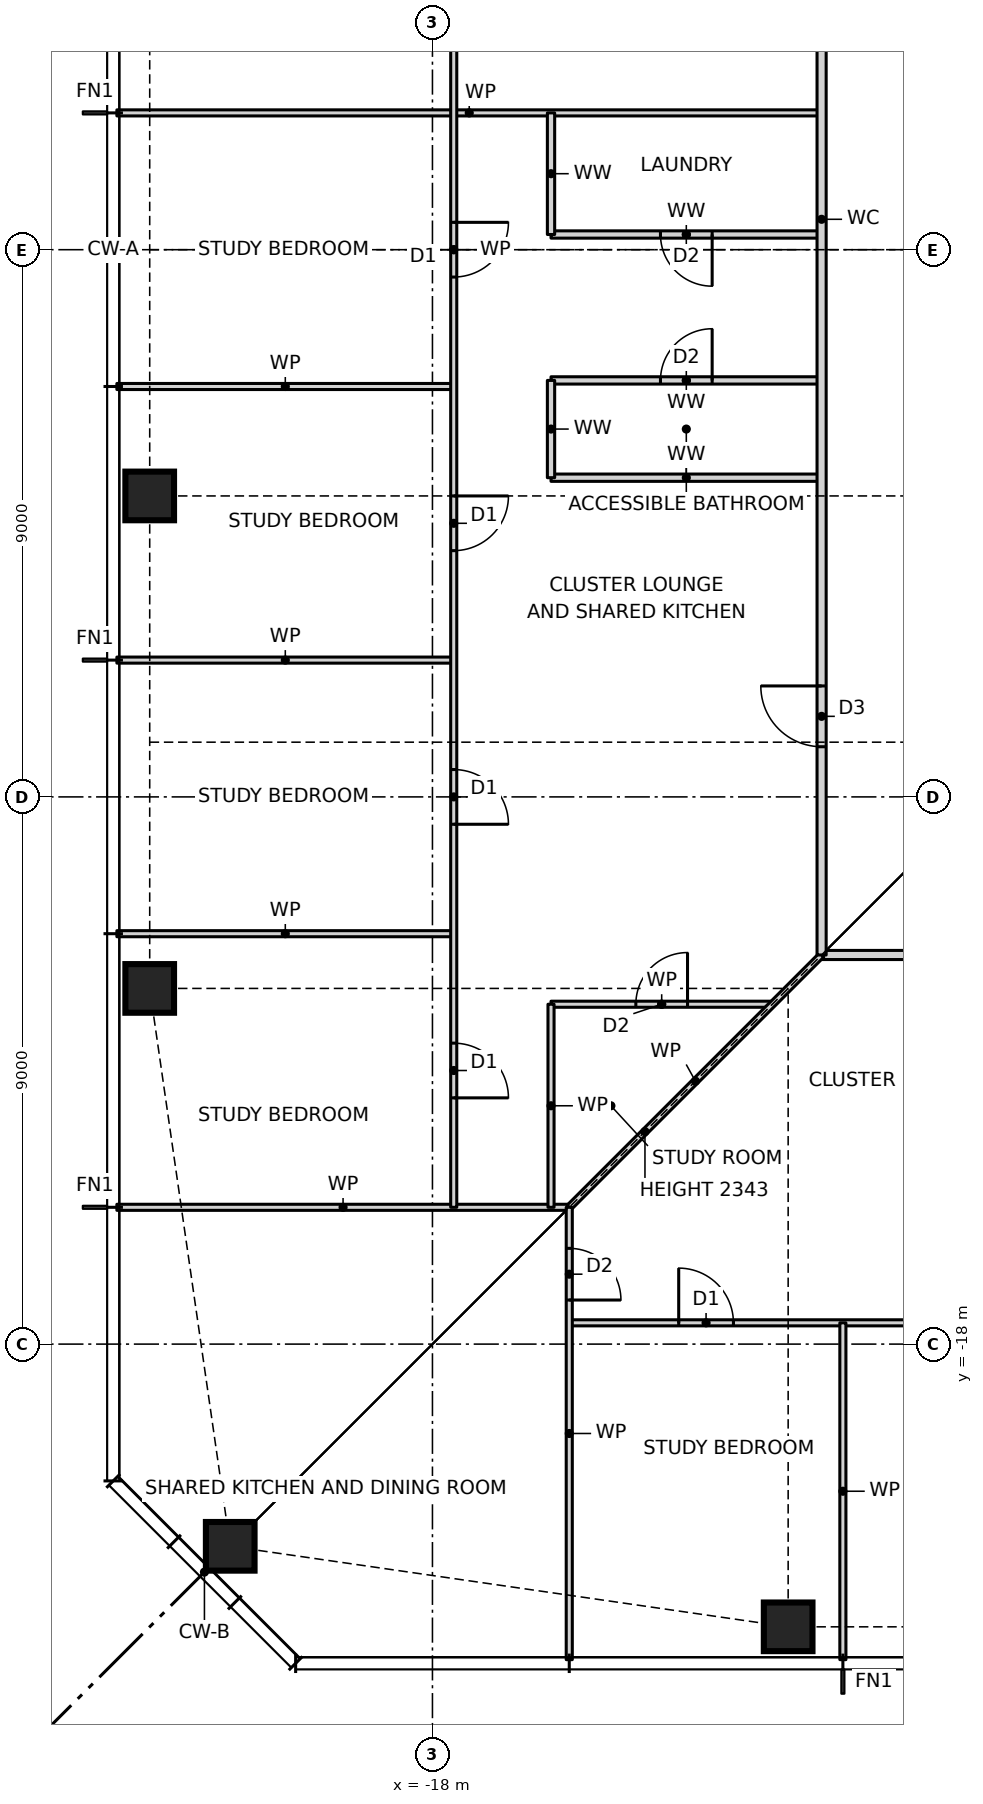
"""IFC4 building model, lengths in metres.
Left out: names, types, materials, properties, quantities, classifications, styles, units other than length and angle.
Written with IfcOpenShell. Run it as: python <this file> out.ifc"""

import sys

from ifc_helpers import new_model, si_unit, direction, frame, frame_2d, origin, origin_2d, place, context, subcontext, project, spatial, rectangle, hollow_rectangle, extrude, element, fill, save


model = new_model("IFC4")
c1 = context("Model", 3, precision=1e-05, world=origin(), true_north=direction((0.0, 1.0)))
c2 = subcontext(c1, "Body", "Model", "MODEL_VIEW")
j1 = project(units=[si_unit("LENGTHUNIT", "METRE"), si_unit("PLANEANGLEUNIT", "RADIAN")], contexts=[c1])
p1 = place(None, origin())
s1 = spatial("IfcSite", under=j1, at=p1, CompositionType="ELEMENT")
p2 = place(p1, origin())
s2 = spatial("IfcBuilding", under=s1, at=p2, CompositionType="ELEMENT")
p3 = place(p2, frame((0.0, 0.0, 64.0)))
s3 = spatial("IfcBuildingStorey", under=s2, at=p3, CompositionType="ELEMENT", Elevation=64.0)
for number, where, z_axis, x_axis in (
    (1, (-21.326, -21.326, 0.0), (0.0, 0.0, 1.0), (1.0, 0.0, 0.0)),
    (2, (-12.15, -22.65, 0.0), (0.0, 0.0, 1.0), (1.0, 0.0, 0.0)),
    (3, (-22.65, -4.05, 0.0), (0.0, 0.0, 1.0), (1.0, 0.0, 0.0)),
    (4, (-22.65, -12.15, 0.0), (0.0, 0.0, 1.0), (1.0, 0.0, 0.0)),
):
    element("IfcColumn", number, at=place(p3, frame(where, z_axis=z_axis, x_axis=x_axis)), inside=s3, PredefinedType="COLUMN", context=c2, shape_type="SweptSolid", body=[
        extrude(hollow_rectangle(XDim=0.8, YDim=0.8, WallThickness=0.09, at=origin_2d()), origin(), (0.0, 0.0, 1.0), 3.5),
    ])
p4 = place(p3, frame((-15.75, -17.65, 0.0), z_axis=(0.0, 0.0, 1.0), x_axis=(1.0, 0.0, 0.0)))
e5 = element("IfcWall", 5, at=p4, inside=s3, PredefinedType="PARTITIONING", context=c2, shape_type="SweptSolid", body=[
    extrude(rectangle(XDim=31.5, YDim=0.1, at=frame_2d((15.75, 0.0))), origin(), (0.0, 0.0, 1.0), 3.27),
])
p5 = place(p4, frame((1.8, 0.0, 0.0)))
e6 = element("IfcOpeningElement", 6, at=p5, cuts=e5, PredefinedType="OPENING", context=c2, shape_type="SweptSolid", body=[
    extrude(rectangle(XDim=0.9, YDim=2.1, at=frame_2d((0.45, 1.05))), frame((0.0, 0.06, 0.0), z_axis=(0.0, -1.0, 0.0), x_axis=(1.0, 0.0, 0.0)), (0.0, 0.0, 1.0), 0.12),
])
p6 = place(p4, frame((6.3, 0.0, 0.0)))
e7 = element("IfcOpeningElement", 7, at=p6, cuts=e5, PredefinedType="OPENING", context=c2, shape_type="SweptSolid", body=[
    extrude(rectangle(XDim=0.9, YDim=2.1, at=frame_2d((0.45, 1.05))), frame((0.0, 0.06, 0.0), z_axis=(0.0, -1.0, 0.0), x_axis=(1.0, 0.0, 0.0)), (0.0, 0.0, 1.0), 0.12),
])
p7 = place(p4, frame((10.8, 0.0, 0.0)))
e8 = element("IfcOpeningElement", 8, at=p7, cuts=e5, PredefinedType="OPENING", context=c2, shape_type="SweptSolid", body=[
    extrude(rectangle(XDim=0.9, YDim=2.1, at=frame_2d((0.45, 1.05))), frame((0.0, 0.06, 0.0), z_axis=(0.0, -1.0, 0.0), x_axis=(1.0, 0.0, 0.0)), (0.0, 0.0, 1.0), 0.12),
])
p8 = place(p4, frame((15.3, 0.0, 0.0)))
e9 = element("IfcOpeningElement", 9, at=p8, cuts=e5, PredefinedType="OPENING", context=c2, shape_type="SweptSolid", body=[
    extrude(rectangle(XDim=0.9, YDim=2.1, at=frame_2d((0.45, 1.05))), frame((0.0, 0.06, 0.0), z_axis=(0.0, -1.0, 0.0), x_axis=(1.0, 0.0, 0.0)), (0.0, 0.0, 1.0), 0.12),
])
p9 = place(p4, frame((19.8, 0.0, 0.0)))
e10 = element("IfcOpeningElement", 10, at=p9, cuts=e5, PredefinedType="OPENING", context=c2, shape_type="SweptSolid", body=[
    extrude(rectangle(XDim=0.9, YDim=2.1, at=frame_2d((0.45, 1.05))), frame((0.0, 0.06, 0.0), z_axis=(0.0, -1.0, 0.0), x_axis=(1.0, 0.0, 0.0)), (0.0, 0.0, 1.0), 0.12),
])
p10 = place(p4, frame((24.3, 0.0, 0.0)))
e11 = element("IfcOpeningElement", 11, at=p10, cuts=e5, PredefinedType="OPENING", context=c2, shape_type="SweptSolid", body=[
    extrude(rectangle(XDim=0.9, YDim=2.1, at=frame_2d((0.45, 1.05))), frame((0.0, 0.06, 0.0), z_axis=(0.0, -1.0, 0.0), x_axis=(1.0, 0.0, 0.0)), (0.0, 0.0, 1.0), 0.12),
])
p11 = place(p4, frame((28.8, 0.0, 0.0)))
e12 = element("IfcOpeningElement", 12, at=p11, cuts=e5, PredefinedType="OPENING", context=c2, shape_type="SweptSolid", body=[
    extrude(rectangle(XDim=0.9, YDim=2.1, at=frame_2d((0.45, 1.05))), frame((0.0, 0.06, 0.0), z_axis=(0.0, -1.0, 0.0), x_axis=(1.0, 0.0, 0.0)), (0.0, 0.0, 1.0), 0.12),
])
p12 = place(p3, frame((-23.19, -15.75, 0.0), z_axis=(0.0, 0.0, 1.0), x_axis=(1.0, 0.0, 0.0)))
e13 = element("IfcWall", 13, at=p12, inside=s3, PredefinedType="PARTITIONING", context=c2, shape_type="SweptSolid", body=[
    extrude(rectangle(XDim=7.44, YDim=0.1, at=frame_2d((3.72, 0.0))), origin(), (0.0, 0.0, 1.0), 3.27),
])
p13 = place(p3, frame((-16.05, -12.41, 0.0), z_axis=(0.0, 0.0, 1.0), x_axis=(1.0, 0.0, 0.0)))
e14 = element("IfcWall", 14, at=p13, inside=s3, PredefinedType="PARTITIONING", context=c2, shape_type="SweptSolid", body=[
    extrude(rectangle(XDim=3.64, YDim=0.1, at=frame_2d((1.82, 0.0))), origin(), (0.0, 0.0, 1.0), 3.27),
])
p14 = place(p13, frame((1.395, 0.0, 0.0)))
e15 = element("IfcOpeningElement", 15, at=p14, cuts=e14, PredefinedType="OPENING", context=c2, shape_type="SweptSolid", body=[
    extrude(rectangle(XDim=0.85, YDim=2.1, at=frame_2d((0.425, 1.05))), frame((0.0, 0.06, 0.0), z_axis=(0.0, -1.0, 0.0), x_axis=(1.0, 0.0, 0.0)), (0.0, 0.0, 1.0), 0.12),
])
p15 = place(p3, frame((-11.6, -11.6, 0.0), z_axis=(0.0, 0.0, 1.0), x_axis=(1.0, 0.0, 0.0)))
e16 = element("IfcWall", 16, at=p15, inside=s3, PredefinedType="PARTITIONING", context=c2, shape_type="SweptSolid", body=[
    extrude(rectangle(XDim=23.2, YDim=0.15, at=frame_2d((11.6, 0.0))), origin(), (0.0, 0.0, 1.0), 3.27),
])
p16 = place(p15, frame((1.755, 0.0, 0.0)))
e17 = element("IfcOpeningElement", 17, at=p16, cuts=e16, PredefinedType="OPENING", context=c2, shape_type="SweptSolid", body=[
    extrude(rectangle(XDim=1.0, YDim=2.1, at=frame_2d((0.5, 1.05))), frame((0.0, 0.085, 0.0), z_axis=(0.0, -1.0, 0.0), x_axis=(1.0, 0.0, 0.0)), (0.0, 0.0, 1.0), 0.17),
])
p17 = place(p15, frame((21.025, 0.0, 0.0)))
e18 = element("IfcOpeningElement", 18, at=p17, cuts=e16, PredefinedType="OPENING", context=c2, shape_type="SweptSolid", body=[
    extrude(rectangle(XDim=1.0, YDim=2.1, at=frame_2d((0.5, 1.05))), frame((0.0, 0.085, 0.0), z_axis=(0.0, -1.0, 0.0), x_axis=(1.0, 0.0, 0.0)), (0.0, 0.0, 1.0), 0.17),
])
for number, where, z_axis, x_axis in (
    (19, (-23.19, -11.25, 0.0), (0.0, 0.0, 1.0), (1.0, 0.0, 0.0)),
    (20, (-23.19, -6.75, 0.0), (0.0, 0.0, 1.0), (1.0, 0.0, 0.0)),
):
    element("IfcWall", number, at=place(p3, frame(where, z_axis=z_axis, x_axis=x_axis)), inside=s3, PredefinedType="PARTITIONING", context=c2, shape_type="SweptSolid", body=[
        extrude(rectangle(XDim=5.54, YDim=0.1, at=frame_2d((2.77, 0.0))), origin(), (0.0, 0.0, 1.0), 3.27),
    ])
p18 = place(p3, frame((-16.05, -3.75, 0.0), z_axis=(0.0, 0.0, 1.0), x_axis=(1.0, 0.0, 0.0)))
e21 = element("IfcWall", 21, at=p18, inside=s3, PredefinedType="PARTITIONING", context=c2, shape_type="SweptSolid", body=[
    extrude(rectangle(XDim=4.45, YDim=0.12, at=frame_2d((2.225, 0.0))), origin(), (0.0, 0.0, 1.0), 3.27),
])
p19 = place(p3, frame((-23.19, -2.25, 0.0), z_axis=(0.0, 0.0, 1.0), x_axis=(1.0, 0.0, 0.0)))
e22 = element("IfcWall", 22, at=p19, inside=s3, PredefinedType="PARTITIONING", context=c2, shape_type="SweptSolid", body=[
    extrude(rectangle(XDim=5.54, YDim=0.1, at=frame_2d((2.77, 0.0))), origin(), (0.0, 0.0, 1.0), 3.27),
])
p20 = place(p3, frame((-16.05, -2.15, 0.0), z_axis=(0.0, 0.0, 1.0), x_axis=(1.0, 0.0, 0.0)))
e23 = element("IfcWall", 23, at=p20, inside=s3, PredefinedType="PARTITIONING", context=c2, shape_type="SweptSolid", body=[
    extrude(rectangle(XDim=4.45, YDim=0.12, at=frame_2d((2.225, 0.0))), origin(), (0.0, 0.0, 1.0), 3.27),
])
p21 = place(p20, frame((1.8, 0.0, 0.0)))
e24 = element("IfcOpeningElement", 24, at=p21, cuts=e23, PredefinedType="OPENING", context=c2, shape_type="SweptSolid", body=[
    extrude(rectangle(XDim=0.85, YDim=2.1, at=frame_2d((0.425, 1.05))), frame((0.0, 0.07, 0.0), z_axis=(0.0, -1.0, 0.0), x_axis=(1.0, 0.0, 0.0)), (0.0, 0.0, 1.0), 0.14),
])
p22 = place(p3, frame((-16.05, 0.25, 0.0), z_axis=(0.0, 0.0, 1.0), x_axis=(1.0, 0.0, 0.0)))
e25 = element("IfcWall", 25, at=p22, inside=s3, PredefinedType="PARTITIONING", context=c2, shape_type="SweptSolid", body=[
    extrude(rectangle(XDim=4.45, YDim=0.12, at=frame_2d((2.225, 0.0))), origin(), (0.0, 0.0, 1.0), 3.27),
])
p23 = place(p22, frame((1.8, 0.0, 0.0)))
e26 = element("IfcOpeningElement", 26, at=p23, cuts=e25, PredefinedType="OPENING", context=c2, shape_type="SweptSolid", body=[
    extrude(rectangle(XDim=0.85, YDim=2.1, at=frame_2d((0.425, 1.05))), frame((0.0, 0.07, 0.0), z_axis=(0.0, -1.0, 0.0), x_axis=(1.0, 0.0, 0.0)), (0.0, 0.0, 1.0), 0.14),
])
p24 = place(p3, frame((-23.19, 2.25, 0.0), z_axis=(0.0, 0.0, 1.0), x_axis=(1.0, 0.0, 0.0)))
e27 = element("IfcWall", 27, at=p24, inside=s3, PredefinedType="PARTITIONING", context=c2, shape_type="SweptSolid", body=[
    extrude(rectangle(XDim=11.59, YDim=0.1, at=frame_2d((5.795, 0.0))), origin(), (0.0, 0.0, 1.0), 3.27),
])
p25 = place(p3, frame((-15.75, -15.75, 0.0), z_axis=(0.0, 0.0, 1.0), x_axis=(0.707106781187, 0.707106781187, 0.0)))
e28 = element("IfcWall", 28, at=p25, inside=s3, PredefinedType="PARTITIONING", context=c2, shape_type="SweptSolid", body=[
    extrude(rectangle(XDim=5.869, YDim=0.1, at=frame_2d((2.935, 0.0))), origin(), (0.0, 0.0, 1.0), 2.343),
])
p26 = place(p3, frame((-11.25, -23.19, 0.0), z_axis=(0.0, 0.0, 1.0), x_axis=(0.0, 1.0, 0.0)))
e29 = element("IfcWall", 29, at=p26, inside=s3, PredefinedType="PARTITIONING", context=c2, shape_type="SweptSolid", body=[
    extrude(rectangle(XDim=5.54, YDim=0.1, at=frame_2d((2.77, 0.0))), origin(), (0.0, 0.0, 1.0), 3.27),
])
p27 = place(p3, frame((-11.6, -11.6, 0.0), z_axis=(0.0, 0.0, 1.0), x_axis=(0.0, 1.0, 0.0)))
e30 = element("IfcWall", 30, at=p27, inside=s3, PredefinedType="PARTITIONING", context=c2, shape_type="SweptSolid", body=[
    extrude(rectangle(XDim=24.2, YDim=0.15, at=frame_2d((12.1, 0.0))), origin(), (0.0, 0.0, 1.0), 3.27),
])
p28 = place(p27, frame((19.225, 0.0, 0.0)))
e31 = element("IfcOpeningElement", 31, at=p28, cuts=e30, PredefinedType="OPENING", context=c2, shape_type="SweptSolid", body=[
    extrude(rectangle(XDim=1.0, YDim=2.1, at=frame_2d((0.5, 1.05))), frame((0.0, 0.085, 0.0), z_axis=(0.0, -1.0, 0.0), x_axis=(1.0, 0.0, 0.0)), (0.0, 0.0, 1.0), 0.17),
])
p29 = place(p27, frame((3.425, 0.0, 0.0)))
e32 = element("IfcOpeningElement", 32, at=p29, cuts=e30, PredefinedType="OPENING", context=c2, shape_type="SweptSolid", body=[
    extrude(rectangle(XDim=1.0, YDim=2.1, at=frame_2d((0.5, 1.05))), frame((0.0, 0.085, 0.0), z_axis=(0.0, -1.0, 0.0), x_axis=(1.0, 0.0, 0.0)), (0.0, 0.0, 1.0), 0.17),
])
p30 = place(p3, frame((-15.75, -23.19, 0.0), z_axis=(0.0, 0.0, 1.0), x_axis=(0.0, 1.0, 0.0)))
e33 = element("IfcWall", 33, at=p30, inside=s3, PredefinedType="PARTITIONING", context=c2, shape_type="SweptSolid", body=[
    extrude(rectangle(XDim=7.44, YDim=0.1, at=frame_2d((3.72, 0.0))), origin(), (0.0, 0.0, 1.0), 3.27),
])
p31 = place(p30, frame((5.915, 0.0, 0.0)))
e34 = element("IfcOpeningElement", 34, at=p31, cuts=e33, PredefinedType="OPENING", context=c2, shape_type="SweptSolid", body=[
    extrude(rectangle(XDim=0.85, YDim=2.1, at=frame_2d((0.425, 1.05))), frame((0.0, 0.06, 0.0), z_axis=(0.0, -1.0, 0.0), x_axis=(1.0, 0.0, 0.0)), (0.0, 0.0, 1.0), 0.12),
])
p32 = place(p3, frame((-16.05, -15.75, 0.0), z_axis=(0.0, 0.0, 1.0), x_axis=(0.0, 1.0, 0.0)))
e35 = element("IfcWall", 35, at=p32, inside=s3, PredefinedType="PARTITIONING", context=c2, shape_type="SweptSolid", body=[
    extrude(rectangle(XDim=3.34, YDim=0.1, at=frame_2d((1.67, 0.0))), origin(), (0.0, 0.0, 1.0), 3.27),
])
p33 = place(p3, frame((-16.05, -3.75, 0.0), z_axis=(0.0, 0.0, 1.0), x_axis=(0.0, 1.0, 0.0)))
e36 = element("IfcWall", 36, at=p33, inside=s3, PredefinedType="PARTITIONING", context=c2, shape_type="SweptSolid", body=[
    extrude(rectangle(XDim=1.6, YDim=0.12, at=frame_2d((0.8, 0.0))), origin(), (0.0, 0.0, 1.0), 3.27),
])
p34 = place(p3, frame((-16.05, 0.25, 0.0), z_axis=(0.0, 0.0, 1.0), x_axis=(0.0, 1.0, 0.0)))
e37 = element("IfcWall", 37, at=p34, inside=s3, PredefinedType="PARTITIONING", context=c2, shape_type="SweptSolid", body=[
    extrude(rectangle(XDim=2.0, YDim=0.12, at=frame_2d((1.0, 0.0))), origin(), (0.0, 0.0, 1.0), 3.27),
])
p35 = place(p3, frame((-17.65, -15.75, 0.0), z_axis=(0.0, 0.0, 1.0), x_axis=(0.0, 1.0, 0.0)))
e38 = element("IfcWall", 38, at=p35, inside=s3, PredefinedType="PARTITIONING", context=c2, shape_type="SweptSolid", body=[
    extrude(rectangle(XDim=31.5, YDim=0.1, at=frame_2d((15.75, 0.0))), origin(), (0.0, 0.0, 1.0), 3.27),
])
p36 = place(p35, frame((28.8, 0.0, 0.0)))
e39 = element("IfcOpeningElement", 39, at=p36, cuts=e38, PredefinedType="OPENING", context=c2, shape_type="SweptSolid", body=[
    extrude(rectangle(XDim=0.9, YDim=2.1, at=frame_2d((0.45, 1.05))), frame((0.0, 0.06, 0.0), z_axis=(0.0, -1.0, 0.0), x_axis=(1.0, 0.0, 0.0)), (0.0, 0.0, 1.0), 0.12),
])
p37 = place(p35, frame((24.3, 0.0, 0.0)))
e40 = element("IfcOpeningElement", 40, at=p37, cuts=e38, PredefinedType="OPENING", context=c2, shape_type="SweptSolid", body=[
    extrude(rectangle(XDim=0.9, YDim=2.1, at=frame_2d((0.45, 1.05))), frame((0.0, 0.06, 0.0), z_axis=(0.0, -1.0, 0.0), x_axis=(1.0, 0.0, 0.0)), (0.0, 0.0, 1.0), 0.12),
])
p38 = place(p35, frame((19.8, 0.0, 0.0)))
e41 = element("IfcOpeningElement", 41, at=p38, cuts=e38, PredefinedType="OPENING", context=c2, shape_type="SweptSolid", body=[
    extrude(rectangle(XDim=0.9, YDim=2.1, at=frame_2d((0.45, 1.05))), frame((0.0, 0.06, 0.0), z_axis=(0.0, -1.0, 0.0), x_axis=(1.0, 0.0, 0.0)), (0.0, 0.0, 1.0), 0.12),
])
p39 = place(p35, frame((15.3, 0.0, 0.0)))
e42 = element("IfcOpeningElement", 42, at=p39, cuts=e38, PredefinedType="OPENING", context=c2, shape_type="SweptSolid", body=[
    extrude(rectangle(XDim=0.9, YDim=2.1, at=frame_2d((0.45, 1.05))), frame((0.0, 0.06, 0.0), z_axis=(0.0, -1.0, 0.0), x_axis=(1.0, 0.0, 0.0)), (0.0, 0.0, 1.0), 0.12),
])
p40 = place(p35, frame((10.8, 0.0, 0.0)))
e43 = element("IfcOpeningElement", 43, at=p40, cuts=e38, PredefinedType="OPENING", context=c2, shape_type="SweptSolid", body=[
    extrude(rectangle(XDim=0.9, YDim=2.1, at=frame_2d((0.45, 1.05))), frame((0.0, 0.06, 0.0), z_axis=(0.0, -1.0, 0.0), x_axis=(1.0, 0.0, 0.0)), (0.0, 0.0, 1.0), 0.12),
])
p41 = place(p35, frame((6.3, 0.0, 0.0)))
e44 = element("IfcOpeningElement", 44, at=p41, cuts=e38, PredefinedType="OPENING", context=c2, shape_type="SweptSolid", body=[
    extrude(rectangle(XDim=0.9, YDim=2.1, at=frame_2d((0.45, 1.05))), frame((0.0, 0.06, 0.0), z_axis=(0.0, -1.0, 0.0), x_axis=(1.0, 0.0, 0.0)), (0.0, 0.0, 1.0), 0.12),
])
p42 = place(p35, frame((1.8, 0.0, 0.0)))
e45 = element("IfcOpeningElement", 45, at=p42, cuts=e38, PredefinedType="OPENING", context=c2, shape_type="SweptSolid", body=[
    extrude(rectangle(XDim=0.9, YDim=2.1, at=frame_2d((0.45, 1.05))), frame((0.0, 0.06, 0.0), z_axis=(0.0, -1.0, 0.0), x_axis=(1.0, 0.0, 0.0)), (0.0, 0.0, 1.0), 0.12),
])
p43 = place(p5, origin())
e46 = element("IfcDoor", 46, at=p43, inside=s3, OperationType="SINGLE_SWING_LEFT", PredefinedType="DOOR", context=c2, shape_type="SweptSolid", body=[
    extrude(rectangle(XDim=0.9, YDim=2.1, at=frame_2d((0.45, 1.05))), frame((0.0, 0.025, 0.0), z_axis=(0.0, -1.0, 0.0), x_axis=(1.0, 0.0, 0.0)), (0.0, 0.0, 1.0), 0.05),
])
fill(e6, e46)
p44 = place(p39, frame((0.9, 0.0, 0.0), z_axis=(0.0, 0.0, 1.0), x_axis=(-1.0, 0.0, 0.0)))
e47 = element("IfcDoor", 47, at=p44, inside=s3, OperationType="SINGLE_SWING_LEFT", PredefinedType="DOOR", context=c2, shape_type="SweptSolid", body=[
    extrude(rectangle(XDim=0.9, YDim=2.1, at=frame_2d((0.45, 1.05))), frame((0.0, 0.025, 0.0), z_axis=(0.0, -1.0, 0.0), x_axis=(1.0, 0.0, 0.0)), (0.0, 0.0, 1.0), 0.05),
])
fill(e42, e47)
p45 = place(p40, frame((0.9, 0.0, 0.0), z_axis=(0.0, 0.0, 1.0), x_axis=(-1.0, 0.0, 0.0)))
e48 = element("IfcDoor", 48, at=p45, inside=s3, OperationType="SINGLE_SWING_LEFT", PredefinedType="DOOR", context=c2, shape_type="SweptSolid", body=[
    extrude(rectangle(XDim=0.9, YDim=2.1, at=frame_2d((0.45, 1.05))), frame((0.0, 0.025, 0.0), z_axis=(0.0, -1.0, 0.0), x_axis=(1.0, 0.0, 0.0)), (0.0, 0.0, 1.0), 0.05),
])
fill(e43, e48)
p46 = place(p41, frame((0.9, 0.0, 0.0), z_axis=(0.0, 0.0, 1.0), x_axis=(-1.0, 0.0, 0.0)))
e49 = element("IfcDoor", 49, at=p46, inside=s3, OperationType="SINGLE_SWING_RIGHT", PredefinedType="DOOR", context=c2, shape_type="SweptSolid", body=[
    extrude(rectangle(XDim=0.9, YDim=2.1, at=frame_2d((0.45, 1.05))), frame((0.0, 0.025, 0.0), z_axis=(0.0, -1.0, 0.0), x_axis=(1.0, 0.0, 0.0)), (0.0, 0.0, 1.0), 0.05),
])
fill(e44, e49)
p47 = place(p42, frame((0.9, 0.0, 0.0), z_axis=(0.0, 0.0, 1.0), x_axis=(-1.0, 0.0, 0.0)))
e50 = element("IfcDoor", 50, at=p47, inside=s3, OperationType="SINGLE_SWING_RIGHT", PredefinedType="DOOR", context=c2, shape_type="SweptSolid", body=[
    extrude(rectangle(XDim=0.9, YDim=2.1, at=frame_2d((0.45, 1.05))), frame((0.0, 0.025, 0.0), z_axis=(0.0, -1.0, 0.0), x_axis=(1.0, 0.0, 0.0)), (0.0, 0.0, 1.0), 0.05),
])
fill(e45, e50)
p48 = place(p29, origin())
e51 = element("IfcDoor", 51, at=p48, inside=s3, OperationType="SINGLE_SWING_RIGHT", PredefinedType="DOOR", context=c2, shape_type="SweptSolid", body=[
    extrude(rectangle(XDim=1.0, YDim=2.1, at=frame_2d((0.5, 1.05))), frame((0.0, 0.025, 0.0), z_axis=(0.0, -1.0, 0.0), x_axis=(1.0, 0.0, 0.0)), (0.0, 0.0, 1.0), 0.05),
])
fill(e32, e51)
p49 = place(p23, frame((0.85, 0.0, 0.0), z_axis=(0.0, 0.0, 1.0), x_axis=(-1.0, 0.0, 0.0)))
e52 = element("IfcDoor", 52, at=p49, inside=s3, OperationType="SINGLE_SWING_LEFT", PredefinedType="DOOR", context=c2, shape_type="SweptSolid", body=[
    extrude(rectangle(XDim=0.85, YDim=2.1, at=frame_2d((0.425, 1.05))), frame((0.0, 0.025, 0.0), z_axis=(0.0, -1.0, 0.0), x_axis=(1.0, 0.0, 0.0)), (0.0, 0.0, 1.0), 0.05),
])
fill(e26, e52)
p50 = place(p21, origin())
e53 = element("IfcDoor", 53, at=p50, inside=s3, OperationType="SINGLE_SWING_RIGHT", PredefinedType="DOOR", context=c2, shape_type="SweptSolid", body=[
    extrude(rectangle(XDim=0.85, YDim=2.1, at=frame_2d((0.425, 1.05))), frame((0.0, 0.025, 0.0), z_axis=(0.0, -1.0, 0.0), x_axis=(1.0, 0.0, 0.0)), (0.0, 0.0, 1.0), 0.05),
])
fill(e24, e53)
p51 = place(p14, origin())
e54 = element("IfcDoor", 54, at=p51, inside=s3, OperationType="SINGLE_SWING_RIGHT", PredefinedType="DOOR", context=c2, shape_type="SweptSolid", body=[
    extrude(rectangle(XDim=0.85, YDim=2.1, at=frame_2d((0.425, 1.05))), frame((0.0, 0.025, 0.0), z_axis=(0.0, -1.0, 0.0), x_axis=(1.0, 0.0, 0.0)), (0.0, 0.0, 1.0), 0.05),
])
fill(e15, e54)
p52 = place(p31, frame((0.85, 0.0, 0.0), z_axis=(0.0, 0.0, 1.0), x_axis=(-1.0, 0.0, 0.0)))
e55 = element("IfcDoor", 55, at=p52, inside=s3, OperationType="SINGLE_SWING_RIGHT", PredefinedType="DOOR", context=c2, shape_type="SweptSolid", body=[
    extrude(rectangle(XDim=0.85, YDim=2.1, at=frame_2d((0.425, 1.05))), frame((0.0, 0.025, 0.0), z_axis=(0.0, -1.0, 0.0), x_axis=(1.0, 0.0, 0.0)), (0.0, 0.0, 1.0), 0.05),
])
fill(e34, e55)
save(model, sys.argv[1])
